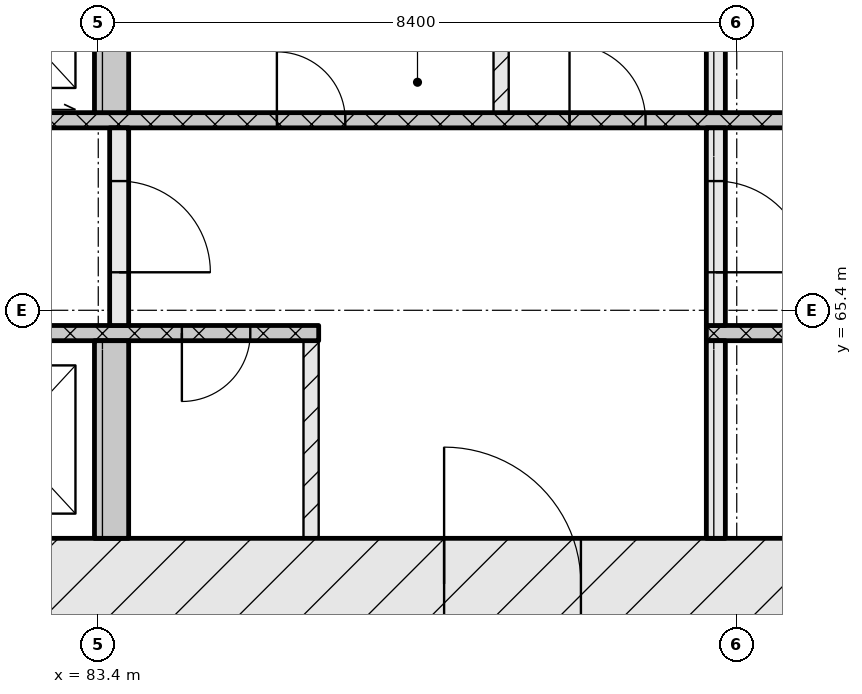
"""IFC4 building model, lengths in metres.
Left out: names, types, materials, properties, quantities, classifications, styles, units other than length and angle.
Written with IfcOpenShell. Run it as: python <this file> out.ifc"""

import sys

from ifc_helpers import new_model, si_unit, direction, frame, frame_2d, origin, place, context, subcontext, project, spatial, rectangle, extrude, element, fill, save


model = new_model("IFC4")
c1 = context("Model", 3, precision=1e-05, world=origin(), true_north=direction((0.0, 1.0)))
c2 = subcontext(c1, "Body", "Model", "MODEL_VIEW")
j1 = project(units=[si_unit("LENGTHUNIT", "METRE"), si_unit("PLANEANGLEUNIT", "RADIAN")], contexts=[c1])
p1 = place(None, origin())
s1 = spatial("IfcSite", under=j1, at=p1, CompositionType="ELEMENT")
p2 = place(p1, origin())
s2 = spatial("IfcBuilding", under=s1, at=p2, CompositionType="ELEMENT")
p3 = place(p2, frame((0.0, 0.0, 55.2)))
s3 = spatial("IfcBuildingStorey", under=s2, at=p3, CompositionType="ELEMENT", Elevation=55.2)
p4 = place(p3, frame((66.6, 61.8, 0.0), z_axis=(0.0, 0.0, 1.0), x_axis=(1.0, 0.0, 0.0)))
e1 = element("IfcWall", 1, at=p4, inside=s3, PredefinedType="SOLIDWALL", context=c2, shape_type="SweptSolid", body=[
    extrude(rectangle(XDim=42.0, YDim=1.2, at=frame_2d((21.0, 0.0))), origin(), (0.0, 0.0, 1.0), 3.32),
])
p5 = place(p4, frame((21.35, 0.0, 0.0)))
e2 = element("IfcOpeningElement", 2, at=p5, cuts=e1, PredefinedType="OPENING", context=c2, shape_type="SweptSolid", body=[
    extrude(rectangle(XDim=1.8, YDim=2.1, at=frame_2d((0.9, 1.05))), frame((0.0, 0.61, 0.0), z_axis=(0.0, -1.0, 0.0), x_axis=(1.0, 0.0, 0.0)), (0.0, 0.0, 1.0), 1.22),
])
p6 = place(p3, frame((83.575, 62.4, 0.0), z_axis=(0.0, 0.0, 1.0), x_axis=(0.0, 1.0, 0.0)))
e3 = element("IfcWall", 3, at=p6, inside=s3, PredefinedType="SOLIDWALL", context=c2, shape_type="SweptSolid", body=[
    extrude(rectangle(XDim=2.6, YDim=0.45, at=frame_2d((1.3, 0.0))), origin(), (0.0, 0.0, 1.0), 3.32),
])
p7 = place(p3, frame((86.2, 62.4, 0.0), z_axis=(0.0, 0.0, 1.0), x_axis=(0.0, 1.0, 0.0)))
e4 = element("IfcWall", 4, at=p7, inside=s3, PredefinedType="PARTITIONING", context=c2, shape_type="SweptSolid", body=[
    extrude(rectangle(XDim=2.6, YDim=0.2, at=frame_2d((1.3, 0.0))), origin(), (0.0, 0.0, 1.0), 3.32),
])
p8 = place(p3, frame((91.525, 62.4, 0.0), z_axis=(0.0, 0.0, 1.0), x_axis=(0.0, 1.0, 0.0)))
e5 = element("IfcWall", 5, at=p8, inside=s3, PredefinedType="SOLIDWALL", context=c2, shape_type="SweptSolid", body=[
    extrude(rectangle(XDim=2.6, YDim=0.25, at=frame_2d((1.3, 0.0))), origin(), (0.0, 0.0, 1.0), 3.32),
])
p9 = place(p3, frame((67.8, 65.1, 0.0), z_axis=(0.0, 0.0, 1.0), x_axis=(1.0, 0.0, 0.0)))
e6 = element("IfcWall", 6, at=p9, inside=s3, PredefinedType="SOLIDWALL", context=c2, shape_type="SweptSolid", body=[
    extrude(rectangle(XDim=18.5, YDim=0.2, at=frame_2d((9.25, 0.0))), origin(), (0.0, 0.0, 1.0), 3.32),
])
p10 = place(p9, frame((7.27, 0.0, 0.0)))
e7 = element("IfcOpeningElement", 7, at=p10, cuts=e6, PredefinedType="OPENING", context=c2, shape_type="SweptSolid", body=[
    extrude(rectangle(XDim=0.9, YDim=2.1, at=frame_2d((0.45, 1.05))), frame((0.0, 0.11, 0.0), z_axis=(0.0, -1.0, 0.0), x_axis=(1.0, 0.0, 0.0)), (0.0, 0.0, 1.0), 0.22),
])
p11 = place(p9, frame((8.85, 0.0, 0.0)))
e8 = element("IfcOpeningElement", 8, at=p11, cuts=e6, PredefinedType="OPENING", context=c2, shape_type="SweptSolid", body=[
    extrude(rectangle(XDim=1.1, YDim=2.1, at=frame_2d((0.55, 1.05))), frame((0.0, 0.11, 0.0), z_axis=(0.0, -1.0, 0.0), x_axis=(1.0, 0.0, 0.0)), (0.0, 0.0, 1.0), 0.22),
])
p12 = place(p9, frame((11.35, 0.0, 0.0)))
e9 = element("IfcOpeningElement", 9, at=p12, cuts=e6, PredefinedType="OPENING", context=c2, shape_type="SweptSolid", body=[
    extrude(rectangle(XDim=1.1, YDim=2.1, at=frame_2d((0.55, 1.05))), frame((0.0, 0.11, 0.0), z_axis=(0.0, -1.0, 0.0), x_axis=(1.0, 0.0, 0.0)), (0.0, 0.0, 1.0), 0.22),
])
p13 = place(p9, frame((13.85, 0.0, 0.0)))
e10 = element("IfcOpeningElement", 10, at=p13, cuts=e6, PredefinedType="OPENING", context=c2, shape_type="SweptSolid", body=[
    extrude(rectangle(XDim=1.1, YDim=2.1, at=frame_2d((0.55, 1.05))), frame((0.0, 0.11, 0.0), z_axis=(0.0, -1.0, 0.0), x_axis=(1.0, 0.0, 0.0)), (0.0, 0.0, 1.0), 0.22),
])
p14 = place(p9, frame((16.7, 0.0, 0.0)))
e11 = element("IfcOpeningElement", 11, at=p14, cuts=e6, PredefinedType="OPENING", context=c2, shape_type="SweptSolid", body=[
    extrude(rectangle(XDim=0.9, YDim=2.1, at=frame_2d((0.45, 1.05))), frame((0.0, 0.11, 0.0), z_axis=(0.0, -1.0, 0.0), x_axis=(1.0, 0.0, 0.0)), (0.0, 0.0, 1.0), 0.22),
])
p15 = place(p3, frame((91.4, 65.1, 0.0), z_axis=(0.0, 0.0, 1.0), x_axis=(1.0, 0.0, 0.0)))
e12 = element("IfcWall", 12, at=p15, inside=s3, PredefinedType="SOLIDWALL", context=c2, shape_type="SweptSolid", body=[
    extrude(rectangle(XDim=16.0, YDim=0.2, at=frame_2d((8.0, 0.0))), origin(), (0.0, 0.0, 1.0), 3.32),
])
p16 = place(p15, frame((7.83, 0.0, 0.0)))
e13 = element("IfcOpeningElement", 13, at=p16, cuts=e12, PredefinedType="OPENING", context=c2, shape_type="SweptSolid", body=[
    extrude(rectangle(XDim=0.9, YDim=2.1, at=frame_2d((0.45, 1.05))), frame((0.0, 0.11, 0.0), z_axis=(0.0, -1.0, 0.0), x_axis=(1.0, 0.0, 0.0)), (0.0, 0.0, 1.0), 0.22),
])
p17 = place(p3, frame((83.675, 65.2, 0.0), z_axis=(0.0, 0.0, 1.0), x_axis=(0.0, 1.0, 0.0)))
e14 = element("IfcWall", 14, at=p17, inside=s3, PredefinedType="SOLIDWALL", context=c2, shape_type="SweptSolid", body=[
    extrude(rectangle(XDim=2.6, YDim=0.25, at=frame_2d((1.3, 0.0))), origin(), (0.0, 0.0, 1.0), 3.32),
])
p18 = place(p17, frame((0.7, 0.0, 0.0)))
e15 = element("IfcOpeningElement", 15, at=p18, cuts=e14, PredefinedType="OPENING", context=c2, shape_type="SweptSolid", body=[
    extrude(rectangle(XDim=1.2, YDim=2.1, at=frame_2d((0.6, 1.05))), frame((0.0, 0.135, 0.0), z_axis=(0.0, -1.0, 0.0), x_axis=(1.0, 0.0, 0.0)), (0.0, 0.0, 1.0), 0.27),
])
p19 = place(p3, frame((91.525, 65.2, 0.0), z_axis=(0.0, 0.0, 1.0), x_axis=(0.0, 1.0, 0.0)))
e16 = element("IfcWall", 16, at=p19, inside=s3, PredefinedType="SOLIDWALL", context=c2, shape_type="SweptSolid", body=[
    extrude(rectangle(XDim=2.6, YDim=0.25, at=frame_2d((1.3, 0.0))), origin(), (0.0, 0.0, 1.0), 3.32),
])
p20 = place(p19, frame((0.7, 0.0, 0.0)))
e17 = element("IfcOpeningElement", 17, at=p20, cuts=e16, PredefinedType="OPENING", context=c2, shape_type="SweptSolid", body=[
    extrude(rectangle(XDim=1.2, YDim=2.1, at=frame_2d((0.6, 1.05))), frame((0.0, 0.135, 0.0), z_axis=(0.0, -1.0, 0.0), x_axis=(1.0, 0.0, 0.0)), (0.0, 0.0, 1.0), 0.27),
])
p21 = place(p3, frame((76.05, 67.9, 0.0), z_axis=(0.0, 0.0, 1.0), x_axis=(1.0, 0.0, 0.0)))
e18 = element("IfcWall", 18, at=p21, inside=s3, PredefinedType="SOLIDWALL", context=c2, shape_type="SweptSolid", body=[
    extrude(rectangle(XDim=23.1, YDim=0.2, at=frame_2d((11.55, 0.0))), origin(), (0.0, 0.0, 1.0), 3.32),
])
p22 = place(p21, frame((0.6, 0.0, 0.0)))
e19 = element("IfcOpeningElement", 19, at=p22, cuts=e18, PredefinedType="OPENING", context=c2, shape_type="SweptSolid", body=[
    extrude(rectangle(XDim=1.1, YDim=2.1, at=frame_2d((0.55, 1.05))), frame((0.0, 0.11, 0.0), z_axis=(0.0, -1.0, 0.0), x_axis=(1.0, 0.0, 0.0)), (0.0, 0.0, 1.0), 0.22),
])
p23 = place(p21, frame((3.1, 0.0, 0.0)))
e20 = element("IfcOpeningElement", 20, at=p23, cuts=e18, PredefinedType="OPENING", context=c2, shape_type="SweptSolid", body=[
    extrude(rectangle(XDim=1.1, YDim=2.1, at=frame_2d((0.55, 1.05))), frame((0.0, 0.11, 0.0), z_axis=(0.0, -1.0, 0.0), x_axis=(1.0, 0.0, 0.0)), (0.0, 0.0, 1.0), 0.22),
])
p24 = place(p21, frame((5.6, 0.0, 0.0)))
e21 = element("IfcOpeningElement", 21, at=p24, cuts=e18, PredefinedType="OPENING", context=c2, shape_type="SweptSolid", body=[
    extrude(rectangle(XDim=1.1, YDim=2.1, at=frame_2d((0.55, 1.05))), frame((0.0, 0.11, 0.0), z_axis=(0.0, -1.0, 0.0), x_axis=(1.0, 0.0, 0.0)), (0.0, 0.0, 1.0), 0.22),
])
p25 = place(p21, frame((9.7, 0.0, 0.0)))
e22 = element("IfcOpeningElement", 22, at=p25, cuts=e18, PredefinedType="OPENING", context=c2, shape_type="SweptSolid", body=[
    extrude(rectangle(XDim=0.9, YDim=2.1, at=frame_2d((0.45, 1.05))), frame((0.0, 0.11, 0.0), z_axis=(0.0, -1.0, 0.0), x_axis=(1.0, 0.0, 0.0)), (0.0, 0.0, 1.0), 0.22),
])
p26 = place(p21, frame((13.55, 0.0, 0.0)))
e23 = element("IfcOpeningElement", 23, at=p26, cuts=e18, PredefinedType="OPENING", context=c2, shape_type="SweptSolid", body=[
    extrude(rectangle(XDim=1.0, YDim=2.1, at=frame_2d((0.5, 1.05))), frame((0.0, 0.11, 0.0), z_axis=(0.0, -1.0, 0.0), x_axis=(1.0, 0.0, 0.0)), (0.0, 0.0, 1.0), 0.22),
])
p27 = place(p3, frame((83.575, 68.0, 0.0), z_axis=(0.0, 0.0, 1.0), x_axis=(0.0, 1.0, 0.0)))
e24 = element("IfcWall", 24, at=p27, inside=s3, PredefinedType="SOLIDWALL", context=c2, shape_type="SweptSolid", body=[
    extrude(rectangle(XDim=2.6, YDim=0.45, at=frame_2d((1.3, 0.0))), origin(), (0.0, 0.0, 1.0), 3.32),
])
p28 = place(p3, frame((88.7, 68.0, 0.0), z_axis=(0.0, 0.0, 1.0), x_axis=(0.0, 1.0, 0.0)))
e25 = element("IfcWall", 25, at=p28, inside=s3, PredefinedType="PARTITIONING", context=c2, shape_type="SweptSolid", body=[
    extrude(rectangle(XDim=2.6, YDim=0.2, at=frame_2d((1.3, 0.0))), origin(), (0.0, 0.0, 1.0), 3.32),
])
p29 = place(p3, frame((91.525, 68.0, 0.0), z_axis=(0.0, 0.0, 1.0), x_axis=(0.0, 1.0, 0.0)))
e26 = element("IfcWall", 26, at=p29, inside=s3, PredefinedType="SOLIDWALL", context=c2, shape_type="SweptSolid", body=[
    extrude(rectangle(XDim=2.6, YDim=0.25, at=frame_2d((1.3, 0.0))), origin(), (0.0, 0.0, 1.0), 3.32),
])
p30 = place(p5, origin())
e27 = element("IfcDoor", 27, at=p30, inside=s3, OperationType="DOUBLE_DOOR_SINGLE_SWING", PredefinedType="DOOR", context=c2, shape_type="SweptSolid", body=[
    extrude(rectangle(XDim=1.8, YDim=2.1, at=frame_2d((0.9, 1.05))), frame((0.0, 0.025, 0.0), z_axis=(0.0, -1.0, 0.0), x_axis=(1.0, 0.0, 0.0)), (0.0, 0.0, 1.0), 0.05),
])
fill(e2, e27)
p31 = place(p14, origin())
e28 = element("IfcDoor", 28, at=p31, inside=s3, OperationType="SINGLE_SWING_RIGHT", PredefinedType="DOOR", context=c2, shape_type="SweptSolid", body=[
    extrude(rectangle(XDim=0.9, YDim=2.1, at=frame_2d((0.45, 1.05))), frame((0.0, 0.025, 0.0), z_axis=(0.0, -1.0, 0.0), x_axis=(1.0, 0.0, 0.0)), (0.0, 0.0, 1.0), 0.05),
])
fill(e11, e28)
p32 = place(p18, origin())
e29 = element("IfcDoor", 29, at=p32, inside=s3, OperationType="SINGLE_SWING_RIGHT", PredefinedType="DOOR", context=c2, shape_type="SweptSolid", body=[
    extrude(rectangle(XDim=1.2, YDim=2.1, at=frame_2d((0.6, 1.05))), frame((0.0, 0.025, 0.0), z_axis=(0.0, -1.0, 0.0), x_axis=(1.0, 0.0, 0.0)), (0.0, 0.0, 1.0), 0.05),
])
fill(e15, e29)
p33 = place(p20, origin())
e30 = element("IfcDoor", 30, at=p33, inside=s3, OperationType="SINGLE_SWING_RIGHT", PredefinedType="DOOR", context=c2, shape_type="SweptSolid", body=[
    extrude(rectangle(XDim=1.2, YDim=2.1, at=frame_2d((0.6, 1.05))), frame((0.0, 0.025, 0.0), z_axis=(0.0, -1.0, 0.0), x_axis=(1.0, 0.0, 0.0)), (0.0, 0.0, 1.0), 0.05),
])
fill(e17, e30)
p34 = place(p25, origin())
e31 = element("IfcDoor", 31, at=p34, inside=s3, OperationType="SINGLE_SWING_LEFT", PredefinedType="DOOR", context=c2, shape_type="SweptSolid", body=[
    extrude(rectangle(XDim=0.9, YDim=2.1, at=frame_2d((0.45, 1.05))), frame((0.0, 0.025, 0.0), z_axis=(0.0, -1.0, 0.0), x_axis=(1.0, 0.0, 0.0)), (0.0, 0.0, 1.0), 0.05),
])
fill(e22, e31)
p35 = place(p26, origin())
e32 = element("IfcDoor", 32, at=p35, inside=s3, OperationType="SINGLE_SWING_LEFT", PredefinedType="DOOR", context=c2, shape_type="SweptSolid", body=[
    extrude(rectangle(XDim=1.0, YDim=2.1, at=frame_2d((0.5, 1.05))), frame((0.0, 0.025, 0.0), z_axis=(0.0, -1.0, 0.0), x_axis=(1.0, 0.0, 0.0)), (0.0, 0.0, 1.0), 0.05),
])
fill(e23, e32)
save(model, sys.argv[1])
